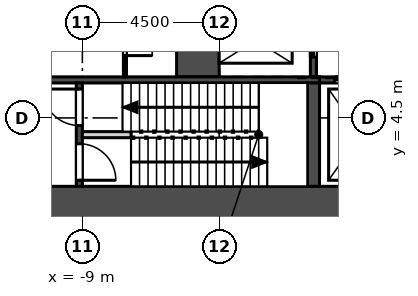
"""IFC4 building model, lengths in metres.
Left out: names, types, materials, properties, quantities, classifications, styles, units other than length and angle.
Written with IfcOpenShell. Run it as: python <this file> out.ifc"""

import sys

from ifc_helpers import new_model, si_unit, direction, frame, frame_2d, origin, place, context, subcontext, project, spatial, rectangle, extrude, element, fill, save


model = new_model("IFC4")
c1 = context("Model", 3, precision=1e-05, world=origin(), true_north=direction((0.0, 1.0)))
c2 = subcontext(c1, "Body", "Model", "MODEL_VIEW")
j1 = project(units=[si_unit("LENGTHUNIT", "METRE"), si_unit("PLANEANGLEUNIT", "RADIAN")], contexts=[c1])
p1 = place(None, origin())
s1 = spatial("IfcSite", under=j1, at=p1, CompositionType="ELEMENT")
p2 = place(p1, origin())
s2 = spatial("IfcBuilding", under=s1, at=p2, CompositionType="ELEMENT")
p3 = place(p2, frame((0.0, 0.0, 132.1)))
s3 = spatial("IfcBuildingStorey", under=s2, at=p3, CompositionType="ELEMENT", Elevation=132.1)
p4 = place(p3, frame((-13.8, 1.65, 0.0), z_axis=(0.0, 0.0, 1.0), x_axis=(1.0, 0.0, 0.0)))
e1 = element("IfcWall", 1, at=p4, inside=s3, PredefinedType="SHEAR", context=c2, shape_type="SweptSolid", body=[
    extrude(rectangle(XDim=27.6, YDim=1.2, at=frame_2d((13.8, 0.0))), origin(), (0.0, 0.0, 1.0), 5.4),
])
p5 = place(p3, frame((-1.4, 5.85, -0.4), z_axis=(0.0, 0.0, 1.0), x_axis=(0.0, 1.0, 0.0)))
e2 = element("IfcWall", 2, at=p5, inside=s3, PredefinedType="SOLIDWALL", context=c2, shape_type="SweptSolid", body=[
    extrude(rectangle(XDim=11.75, YDim=0.2, at=frame_2d((5.875, 0.0))), origin(), (0.0, 0.0, 1.0), 5.4),
])
p6 = place(p5, frame((3.2, 0.0, 0.4)))
e3 = element("IfcOpeningElement", 3, at=p6, cuts=e2, PredefinedType="OPENING", context=c2, shape_type="SweptSolid", body=[
    extrude(rectangle(XDim=1.2, YDim=2.1, at=frame_2d((0.6, 1.05))), frame((0.0, 0.11, 0.0), z_axis=(0.0, -1.0, 0.0), x_axis=(1.0, 0.0, 0.0)), (0.0, 0.0, 1.0), 0.22),
])
p7 = place(p5, frame((0.65, 0.0, 0.4)))
e4 = element("IfcOpeningElement", 4, at=p7, cuts=e2, PredefinedType="OPENING", context=c2, shape_type="SweptSolid", body=[
    extrude(rectangle(XDim=1.1, YDim=2.1, at=frame_2d((0.55, 1.05))), frame((0.0, 0.11, 0.0), z_axis=(0.0, -1.0, 0.0), x_axis=(1.0, 0.0, 0.0)), (0.0, 0.0, 1.0), 0.22),
])
p8 = place(p3, frame((-5.2, 5.85, -0.4), z_axis=(0.0, 0.0, 1.0), x_axis=(0.0, 1.0, 0.0)))
e5 = element("IfcWall", 5, at=p8, inside=s3, PredefinedType="SOLIDWALL", context=c2, shape_type="SweptSolid", body=[
    extrude(rectangle(XDim=2.4, YDim=1.4, at=frame_2d((1.2, 0.0))), origin(), (0.0, 0.0, 1.0), 5.4),
])
p9 = place(p3, frame((-12.6, 5.75, -0.4), z_axis=(0.0, 0.0, 1.0), x_axis=(1.0, 0.0, 0.0)))
e6 = element("IfcWall", 6, at=p9, inside=s3, PredefinedType="SOLIDWALL", context=c2, shape_type="SweptSolid", body=[
    extrude(rectangle(XDim=11.4, YDim=0.2, at=frame_2d((5.7, 0.0))), origin(), (0.0, 0.0, 1.0), 5.4),
])
p10 = place(p3, frame((-1.2, 5.75, -0.4), z_axis=(0.0, 0.0, 1.0), x_axis=(1.0, 0.0, 0.0)))
e7 = element("IfcWall", 7, at=p10, inside=s3, PredefinedType="SOLIDWALL", context=c2, shape_type="SweptSolid", body=[
    extrude(rectangle(XDim=2.4, YDim=0.2, at=frame_2d((1.2, 0.0))), origin(), (0.0, 0.0, 1.0), 5.4),
])
p11 = place(p10, frame((0.5, 0.0, 0.4)))
e8 = element("IfcOpeningElement", 8, at=p11, cuts=e7, PredefinedType="OPENING", context=c2, shape_type="SweptSolid", body=[
    extrude(rectangle(XDim=1.4, YDim=2.1, at=frame_2d((0.7, 1.05))), frame((0.0, 0.11, 0.0), z_axis=(0.0, -1.0, 0.0), x_axis=(1.0, 0.0, 0.0)), (0.0, 0.0, 1.0), 0.22),
])
p12 = place(p3, frame((-9.1, 2.25, -0.4), z_axis=(0.0, 0.0, 1.0), x_axis=(0.0, 1.0, 0.0)))
e9 = element("IfcWall", 9, at=p12, inside=s3, PredefinedType="SOLIDWALL", context=c2, shape_type="SweptSolid", body=[
    extrude(rectangle(XDim=3.4, YDim=0.2, at=frame_2d((1.7, 0.0))), origin(), (0.0, 0.0, 1.0), 5.4),
])
p13 = place(p12, frame((0.2, 0.0, 0.4)))
e10 = element("IfcOpeningElement", 10, at=p13, cuts=e9, PredefinedType="OPENING", context=c2, shape_type="SweptSolid", body=[
    extrude(rectangle(XDim=1.2, YDim=2.1, at=frame_2d((0.6, 1.05))), frame((0.0, 0.11, 0.0), z_axis=(0.0, -1.0, 0.0), x_axis=(1.0, 0.0, 0.0)), (0.0, 0.0, 1.0), 0.22),
])
p14 = place(p12, frame((2.0, 0.0, 0.4)))
e11 = element("IfcOpeningElement", 11, at=p14, cuts=e9, PredefinedType="OPENING", context=c2, shape_type="SweptSolid", body=[
    extrude(rectangle(XDim=1.2, YDim=2.1, at=frame_2d((0.6, 1.05))), frame((0.0, 0.11, 0.0), z_axis=(0.0, -1.0, 0.0), x_axis=(1.0, 0.0, 0.0)), (0.0, 0.0, 1.0), 0.22),
])
p15 = place(p3, frame((-1.4, 2.25, -0.4), z_axis=(0.0, 0.0, 1.0), x_axis=(0.0, 1.0, 0.0)))
e12 = element("IfcWall", 12, at=p15, inside=s3, PredefinedType="SOLIDWALL", context=c2, shape_type="SweptSolid", body=[
    extrude(rectangle(XDim=3.4, YDim=0.4, at=frame_2d((1.7, 0.0))), origin(), (0.0, 0.0, 1.0), 5.4),
])
p16 = place(p3, frame((-7.6, 5.85, 0.0), z_axis=(0.0, 0.0, 1.0), x_axis=(0.0, 1.0, 0.0)))
e13 = element("IfcWall", 13, at=p16, inside=s3, PredefinedType="PARTITIONING", context=c2, shape_type="SweptSolid", body=[
    extrude(rectangle(XDim=2.4, YDim=0.1, at=frame_2d((1.2, 0.0))), origin(), (0.0, 0.0, 1.0), 5.0),
])
p17 = place(p16, frame((0.7, 0.0, 0.0)))
e14 = element("IfcOpeningElement", 14, at=p17, cuts=e13, PredefinedType="OPENING", context=c2, shape_type="SweptSolid", body=[
    extrude(rectangle(XDim=0.9, YDim=2.1, at=frame_2d((0.45, 1.05))), frame((0.0, 0.06, 0.0), z_axis=(0.0, -1.0, 0.0), x_axis=(1.0, 0.0, 0.0)), (0.0, 0.0, 1.0), 0.12),
])
p18 = place(p3, frame((-9.0, 3.95, 0.0), z_axis=(0.0, 0.0, 1.0), x_axis=(1.0, 0.0, 0.0)))
e15 = element("IfcWall", 15, at=p18, inside=s3, PredefinedType="SOLIDWALL", context=c2, shape_type="SweptSolid", body=[
    extrude(rectangle(XDim=1.6, YDim=0.2, at=frame_2d((0.8, 0.0))), origin(), (0.0, 0.0, 1.0), 5.0),
])
p19 = place(p7, origin())
e16 = element("IfcDoor", 16, at=p19, inside=s3, OperationType="SLIDING_TO_RIGHT", PredefinedType="DOOR", context=c2, shape_type="SweptSolid", body=[
    extrude(rectangle(XDim=1.1, YDim=2.1, at=frame_2d((0.55, 1.05))), frame((0.0, 0.025, 0.0), z_axis=(0.0, -1.0, 0.0), x_axis=(1.0, 0.0, 0.0)), (0.0, 0.0, 1.0), 0.05),
])
fill(e4, e16)
p20 = place(p11, origin())
e17 = element("IfcDoor", 17, at=p20, inside=s3, OperationType="SLIDING_TO_LEFT", PredefinedType="DOOR", context=c2, shape_type="SweptSolid", body=[
    extrude(rectangle(XDim=1.4, YDim=2.1, at=frame_2d((0.7, 1.05))), frame((0.0, 0.025, 0.0), z_axis=(0.0, -1.0, 0.0), x_axis=(1.0, 0.0, 0.0)), (0.0, 0.0, 1.0), 0.05),
])
fill(e8, e17)
p21 = place(p17, frame((0.9, 0.0, 0.0), z_axis=(0.0, 0.0, 1.0), x_axis=(-1.0, 0.0, 0.0)))
e18 = element("IfcDoor", 18, at=p21, inside=s3, OperationType="SINGLE_SWING_RIGHT", PredefinedType="DOOR", context=c2, shape_type="SweptSolid", body=[
    extrude(rectangle(XDim=0.9, YDim=2.1, at=frame_2d((0.45, 1.05))), frame((0.0, 0.025, 0.0), z_axis=(0.0, -1.0, 0.0), x_axis=(1.0, 0.0, 0.0)), (0.0, 0.0, 1.0), 0.05),
])
fill(e14, e18)
p22 = place(p13, frame((1.2, 0.0, 0.0), z_axis=(0.0, 0.0, 1.0), x_axis=(-1.0, 0.0, 0.0)))
e19 = element("IfcDoor", 19, at=p22, inside=s3, OperationType="SINGLE_SWING_RIGHT", PredefinedType="DOOR", context=c2, shape_type="SweptSolid", body=[
    extrude(rectangle(XDim=1.2, YDim=2.1, at=frame_2d((0.6, 1.05))), frame((0.0, 0.025, 0.0), z_axis=(0.0, -1.0, 0.0), x_axis=(1.0, 0.0, 0.0)), (0.0, 0.0, 1.0), 0.05),
])
fill(e10, e19)
p23 = place(p14, origin())
e20 = element("IfcDoor", 20, at=p23, inside=s3, OperationType="SINGLE_SWING_RIGHT", PredefinedType="DOOR", context=c2, shape_type="SweptSolid", body=[
    extrude(rectangle(XDim=1.2, YDim=2.1, at=frame_2d((0.6, 1.05))), frame((0.0, 0.025, 0.0), z_axis=(0.0, -1.0, 0.0), x_axis=(1.0, 0.0, 0.0)), (0.0, 0.0, 1.0), 0.05),
])
fill(e11, e20)
save(model, sys.argv[1])
